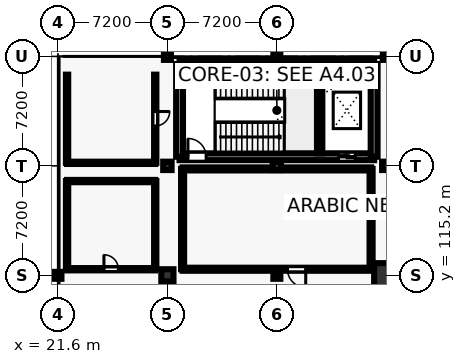
"""IFC4 building model, lengths in metres.
Left out: names, types, materials, properties, quantities, classifications, styles, units other than length and angle.
Written with IfcOpenShell. Run it as: python <this file> out.ifc"""

import sys

from ifc_helpers import new_model, si_unit, direction, frame, frame_2d, origin, origin_2d, place, context, subcontext, project, spatial, rectangle, circle, hollow_circle, extrude, element, fill, save


model = new_model("IFC4")
c1 = context("Model", 3, precision=1e-05, world=origin(), true_north=direction((0.0, 1.0)))
c2 = subcontext(c1, "Body", "Model", "MODEL_VIEW")
j1 = project(units=[si_unit("LENGTHUNIT", "METRE"), si_unit("PLANEANGLEUNIT", "RADIAN")], contexts=[c1])
p1 = place(None, origin())
s1 = spatial("IfcSite", under=j1, at=p1, CompositionType="ELEMENT")
p2 = place(p1, origin())
s2 = spatial("IfcBuilding", under=s1, at=p2, CompositionType="ELEMENT")
p3 = place(p2, frame((0.0, 0.0, 18.6)))
s3 = spatial("IfcBuildingStorey", under=s2, at=p3, CompositionType="ELEMENT", Elevation=18.6)
p4 = place(p3, frame((21.6, 115.2, 0.0), z_axis=(0.0, 0.0, 1.0), x_axis=(1.0, 0.0, 0.0)))
e1 = element("IfcColumn", 1, at=p4, inside=s3, PredefinedType="COLUMN", context=c2, shape_type="SweptSolid", body=[
    extrude(hollow_circle(Radius=0.229, WallThickness=0.02, at=origin_2d()), origin(), (0.0, 0.0, 1.0), 4.4),
])
p5 = place(p3, frame((28.8, 115.2, 0.0), z_axis=(0.0, 0.0, 1.0), x_axis=(1.0, 0.0, 0.0)))
e2 = element("IfcColumn", 2, at=p5, inside=s3, PredefinedType="COLUMN", context=c2, shape_type="SweptSolid", body=[
    extrude(circle(Radius=0.4, at=origin_2d()), origin(), (0.0, 0.0, 1.0), 4.4),
])
p6 = place(p3, frame((28.8, 122.4, 0.0), z_axis=(0.0, 0.0, 1.0), x_axis=(1.0, 0.0, 0.0)))
e3 = element("IfcColumn", 3, at=p6, inside=s3, PredefinedType="COLUMN", context=c2, shape_type="SweptSolid", body=[
    extrude(rectangle(XDim=0.55, YDim=0.55, at=origin_2d()), origin(), (0.0, 0.0, 1.0), 4.4),
])
for number, where, z_axis, x_axis in (
    (4, (28.8, 129.6, 0.0), (0.0, 0.0, 1.0), (1.0, 0.0, 0.0)),
    (5, (36.0, 115.2, 0.0), (0.0, 0.0, 1.0), (1.0, 0.0, 0.0)),
):
    element("IfcColumn", number, at=place(p3, frame(where, z_axis=z_axis, x_axis=x_axis)), inside=s3, PredefinedType="COLUMN", context=c2, shape_type="SweptSolid", body=[
        extrude(hollow_circle(Radius=0.229, WallThickness=0.02, at=origin_2d()), origin(), (0.0, 0.0, 1.0), 4.4),
    ])
p7 = place(p3, frame((36.0, 122.4, 0.0), z_axis=(0.0, 0.0, 1.0), x_axis=(1.0, 0.0, 0.0)))
e6 = element("IfcColumn", 6, at=p7, inside=s3, PredefinedType="COLUMN", context=c2, shape_type="SweptSolid", body=[
    extrude(rectangle(XDim=0.55, YDim=0.55, at=origin_2d()), origin(), (0.0, 0.0, 1.0), 4.4),
])
p8 = place(p3, frame((36.0, 129.6, 0.0), z_axis=(0.0, 0.0, 1.0), x_axis=(1.0, 0.0, 0.0)))
e7 = element("IfcColumn", 7, at=p8, inside=s3, PredefinedType="COLUMN", context=c2, shape_type="SweptSolid", body=[
    extrude(hollow_circle(Radius=0.229, WallThickness=0.02, at=origin_2d()), origin(), (0.0, 0.0, 1.0), 4.4),
])
p9 = place(p3, frame((43.2, 115.2, 0.0), z_axis=(0.0, 0.0, 1.0), x_axis=(1.0, 0.0, 0.0)))
e8 = element("IfcColumn", 8, at=p9, inside=s3, PredefinedType="COLUMN", context=c2, shape_type="SweptSolid", body=[
    extrude(circle(Radius=0.8, at=origin_2d()), origin(), (0.0, 0.0, 1.0), 4.4),
])
p10 = place(p3, frame((43.2, 122.4, 0.0), z_axis=(0.0, 0.0, 1.0), x_axis=(1.0, 0.0, 0.0)))
e9 = element("IfcColumn", 9, at=p10, inside=s3, PredefinedType="COLUMN", context=c2, shape_type="SweptSolid", body=[
    extrude(rectangle(XDim=0.55, YDim=0.55, at=origin_2d()), origin(), (0.0, 0.0, 1.0), 4.4),
])
p11 = place(p3, frame((43.2, 129.6, 0.0), z_axis=(0.0, 0.0, 1.0), x_axis=(1.0, 0.0, 0.0)))
e10 = element("IfcColumn", 10, at=p11, inside=s3, PredefinedType="COLUMN", context=c2, shape_type="SweptSolid", body=[
    extrude(hollow_circle(Radius=0.229, WallThickness=0.02, at=origin_2d()), origin(), (0.0, 0.0, 1.0), 4.4),
])
p12 = place(p3, frame((29.6, 123.0, 0.0), z_axis=(0.0, 0.0, 1.0), x_axis=(1.0, 0.0, 0.0)))
e11 = element("IfcWall", 11, at=p12, inside=s3, PredefinedType="SHEAR", context=c2, shape_type="SweptSolid", body=[
    extrude(rectangle(XDim=12.8, YDim=0.45, at=frame_2d((6.4, 0.0))), origin(), (0.0, 0.0, 1.0), 4.15),
])
p13 = place(p12, frame((0.55, 0.0, 0.0)))
e12 = element("IfcOpeningElement", 12, at=p13, cuts=e11, PredefinedType="OPENING", context=c2, shape_type="SweptSolid", body=[
    extrude(rectangle(XDim=1.2, YDim=2.25, at=frame_2d((0.6, 1.125))), frame((0.0, 0.235, 0.0), z_axis=(0.0, -1.0, 0.0), x_axis=(1.0, 0.0, 0.0)), (0.0, 0.0, 1.0), 0.47),
])
p14 = place(p12, frame((10.458, 0.0, 0.0)))
e13 = element("IfcOpeningElement", 13, at=p14, cuts=e11, PredefinedType="OPENING", context=c2, shape_type="SweptSolid", body=[
    extrude(rectangle(XDim=1.1, YDim=2.2, at=frame_2d((0.55, 1.1))), frame((0.0, 0.235, 0.0), z_axis=(0.0, -1.0, 0.0), x_axis=(1.0, 0.0, 0.0)), (0.0, 0.0, 1.0), 0.47),
])
p15 = place(p3, frame((29.6, 129.1, 0.0), z_axis=(0.0, 0.0, 1.0), x_axis=(1.0, 0.0, 0.0)))
e14 = element("IfcWall", 14, at=p15, inside=s3, PredefinedType="SHEAR", context=c2, shape_type="SweptSolid", body=[
    extrude(rectangle(XDim=12.8, YDim=0.45, at=frame_2d((6.4, 0.0))), origin(), (0.0, 0.0, 1.0), 4.15),
])
for number, where, z_axis, x_axis in (
    (15, (29.6, 123.0, 0.0), (0.0, 0.0, 1.0), (0.0, 1.0, 0.0)),
    (16, (42.4, 123.0, 0.0), (0.0, 0.0, 1.0), (0.0, 1.0, 0.0)),
):
    element("IfcWall", number, at=place(p3, frame(where, z_axis=z_axis, x_axis=x_axis)), inside=s3, PredefinedType="SHEAR", context=c2, shape_type="SweptSolid", body=[
        extrude(rectangle(XDim=6.1, YDim=0.45, at=frame_2d((3.05, 0.0))), origin(), (0.0, 0.0, 1.0), 4.15),
    ])
p16 = place(p3, frame((38.816, 123.225, 0.0), z_axis=(0.0, 0.0, 1.0), x_axis=(0.0, 1.0, 0.0)))
e17 = element("IfcWall", 17, at=p16, inside=s3, PredefinedType="SHEAR", context=c2, shape_type="SweptSolid", body=[
    extrude(rectangle(XDim=5.65, YDim=0.35, at=frame_2d((2.825, 0.0))), origin(), (0.0, 0.0, 1.0), 4.15),
])
p17 = place(p3, frame((29.8, 115.6, 0.0), z_axis=(0.0, 0.0, 1.0), x_axis=(1.0, 0.0, 0.0)))
e18 = element("IfcWall", 18, at=p17, inside=s3, PredefinedType="PARTITIONING", context=c2, shape_type="SweptSolid", body=[
    extrude(rectangle(XDim=12.4, YDim=0.2, at=frame_2d((6.2, 0.0))), origin(), (0.0, 0.0, 1.0), 3.21),
])
p18 = place(p17, frame((6.9, 0.0, 0.0)))
e19 = element("IfcOpeningElement", 19, at=p18, cuts=e18, PredefinedType="OPENING", context=c2, shape_type="SweptSolid", body=[
    extrude(rectangle(XDim=1.2, YDim=2.25, at=frame_2d((0.6, 1.125))), frame((0.0, 0.11, 0.0), z_axis=(0.0, -1.0, 0.0), x_axis=(1.0, 0.0, 0.0)), (0.0, 0.0, 1.0), 0.22),
])
p19 = place(p3, frame((42.2, 115.6, 0.0), z_axis=(0.0, 0.0, 1.0), x_axis=(0.0, 1.0, 0.0)))
e20 = element("IfcWall", 20, at=p19, inside=s3, PredefinedType="PARTITIONING", context=c2, shape_type="SweptSolid", body=[
    extrude(rectangle(XDim=6.6, YDim=0.2, at=frame_2d((3.3, 0.0))), origin(), (0.0, 0.0, 1.0), 3.21),
])
p20 = place(p3, frame((42.2, 122.2, 0.0), z_axis=(0.0, 0.0, 1.0), x_axis=(-1.0, 0.0, 0.0)))
e21 = element("IfcWall", 21, at=p20, inside=s3, PredefinedType="PARTITIONING", context=c2, shape_type="SweptSolid", body=[
    extrude(rectangle(XDim=12.4, YDim=0.2, at=frame_2d((6.2, 0.0))), origin(), (0.0, 0.0, 1.0), 3.21),
])
p21 = place(p3, frame((29.8, 122.2, 0.0), z_axis=(0.0, 0.0, 1.0), x_axis=(0.0, -1.0, 0.0)))
e22 = element("IfcWall", 22, at=p21, inside=s3, PredefinedType="PARTITIONING", context=c2, shape_type="SweptSolid", body=[
    extrude(rectangle(XDim=6.6, YDim=0.2, at=frame_2d((3.3, 0.0))), origin(), (0.0, 0.0, 1.0), 3.21),
])
p22 = place(p3, frame((22.2, 115.6, 0.0), z_axis=(0.0, 0.0, 1.0), x_axis=(1.0, 0.0, 0.0)))
e23 = element("IfcWall", 23, at=p22, inside=s3, PredefinedType="PARTITIONING", context=c2, shape_type="SweptSolid", body=[
    extrude(rectangle(XDim=5.8, YDim=0.15, at=frame_2d((2.9, 0.0))), origin(), (0.0, 0.0, 1.0), 3.21),
])
p23 = place(p22, frame((2.425, 0.0, 0.0)))
e24 = element("IfcOpeningElement", 24, at=p23, cuts=e23, PredefinedType="OPENING", context=c2, shape_type="SweptSolid", body=[
    extrude(rectangle(XDim=0.95, YDim=2.15, at=frame_2d((0.475, 1.075))), frame((0.0, 0.085, 0.0), z_axis=(0.0, -1.0, 0.0), x_axis=(1.0, 0.0, 0.0)), (0.0, 0.0, 1.0), 0.17),
])
p24 = place(p3, frame((28.0, 115.6, 0.0), z_axis=(0.0, 0.0, 1.0), x_axis=(0.0, 1.0, 0.0)))
e25 = element("IfcWall", 25, at=p24, inside=s3, PredefinedType="PARTITIONING", context=c2, shape_type="SweptSolid", body=[
    extrude(rectangle(XDim=5.8, YDim=0.15, at=frame_2d((2.9, 0.0))), origin(), (0.0, 0.0, 1.0), 3.21),
])
p25 = place(p3, frame((28.0, 121.4, 0.0), z_axis=(0.0, 0.0, 1.0), x_axis=(-1.0, 0.0, 0.0)))
e26 = element("IfcWall", 26, at=p25, inside=s3, PredefinedType="PARTITIONING", context=c2, shape_type="SweptSolid", body=[
    extrude(rectangle(XDim=5.8, YDim=0.15, at=frame_2d((2.9, 0.0))), origin(), (0.0, 0.0, 1.0), 3.21),
])
p26 = place(p3, frame((22.2, 121.4, 0.0), z_axis=(0.0, 0.0, 1.0), x_axis=(0.0, -1.0, 0.0)))
e27 = element("IfcWall", 27, at=p26, inside=s3, PredefinedType="PARTITIONING", context=c2, shape_type="SweptSolid", body=[
    extrude(rectangle(XDim=5.8, YDim=0.15, at=frame_2d((2.9, 0.0))), origin(), (0.0, 0.0, 1.0), 3.21),
])
p27 = place(p3, frame((22.2, 122.6, 0.0), z_axis=(0.0, 0.0, 1.0), x_axis=(1.0, 0.0, 0.0)))
e28 = element("IfcWall", 28, at=p27, inside=s3, PredefinedType="PARTITIONING", context=c2, shape_type="SweptSolid", body=[
    extrude(rectangle(XDim=5.8, YDim=0.15, at=frame_2d((2.9, 0.0))), origin(), (0.0, 0.0, 1.0), 3.21),
])
p28 = place(p3, frame((28.0, 122.6, 0.0), z_axis=(0.0, 0.0, 1.0), x_axis=(0.0, 1.0, 0.0)))
e29 = element("IfcWall", 29, at=p28, inside=s3, PredefinedType="PARTITIONING", context=c2, shape_type="SweptSolid", body=[
    extrude(rectangle(XDim=5.8, YDim=0.15, at=frame_2d((2.9, 0.0))), origin(), (0.0, 0.0, 1.0), 3.21),
])
p29 = place(p28, frame((2.425, 0.0, 0.0)))
e30 = element("IfcOpeningElement", 30, at=p29, cuts=e29, PredefinedType="OPENING", context=c2, shape_type="SweptSolid", body=[
    extrude(rectangle(XDim=0.95, YDim=2.15, at=frame_2d((0.475, 1.075))), frame((0.0, 0.085, 0.0), z_axis=(0.0, -1.0, 0.0), x_axis=(1.0, 0.0, 0.0)), (0.0, 0.0, 1.0), 0.17),
])
p30 = place(p3, frame((22.2, 128.4, 0.0), z_axis=(0.0, 0.0, 1.0), x_axis=(0.0, -1.0, 0.0)))
e31 = element("IfcWall", 31, at=p30, inside=s3, PredefinedType="PARTITIONING", context=c2, shape_type="SweptSolid", body=[
    extrude(rectangle(XDim=5.8, YDim=0.15, at=frame_2d((2.9, 0.0))), origin(), (0.0, 0.0, 1.0), 3.21),
])
p31 = place(p13, origin())
e32 = element("IfcDoor", 32, at=p31, inside=s3, OperationType="SINGLE_SWING_LEFT", PredefinedType="DOOR", context=c2, shape_type="SweptSolid", body=[
    extrude(rectangle(XDim=1.2, YDim=2.25, at=frame_2d((0.6, 1.125))), frame((0.0, 0.025, 0.0), z_axis=(0.0, -1.0, 0.0), x_axis=(1.0, 0.0, 0.0)), (0.0, 0.0, 1.0), 0.05),
])
fill(e12, e32)
p32 = place(p14, origin())
e33 = element("IfcDoor", 33, at=p32, inside=s3, OperationType="SLIDING_TO_RIGHT", PredefinedType="DOOR", context=c2, shape_type="SweptSolid", body=[
    extrude(rectangle(XDim=1.1, YDim=2.2, at=frame_2d((0.55, 1.1))), frame((0.0, 0.025, 0.0), z_axis=(0.0, -1.0, 0.0), x_axis=(1.0, 0.0, 0.0)), (0.0, 0.0, 1.0), 0.05),
])
fill(e13, e33)
p33 = place(p18, frame((1.2, 0.0, 0.0), z_axis=(0.0, 0.0, 1.0), x_axis=(-1.0, 0.0, 0.0)))
e34 = element("IfcDoor", 34, at=p33, inside=s3, OperationType="SINGLE_SWING_RIGHT", PredefinedType="DOOR", context=c2, shape_type="SweptSolid", body=[
    extrude(rectangle(XDim=1.2, YDim=2.25, at=frame_2d((0.6, 1.125))), frame((0.0, 0.025, 0.0), z_axis=(0.0, -1.0, 0.0), x_axis=(1.0, 0.0, 0.0)), (0.0, 0.0, 1.0), 0.05),
])
fill(e19, e34)
p34 = place(p23, origin())
e35 = element("IfcDoor", 35, at=p34, inside=s3, OperationType="SINGLE_SWING_LEFT", PredefinedType="DOOR", context=c2, shape_type="SweptSolid", body=[
    extrude(rectangle(XDim=0.95, YDim=2.15, at=frame_2d((0.475, 1.075))), frame((0.0, 0.025, 0.0), z_axis=(0.0, -1.0, 0.0), x_axis=(1.0, 0.0, 0.0)), (0.0, 0.0, 1.0), 0.05),
])
fill(e24, e35)
p35 = place(p29, frame((0.95, 0.0, 0.0), z_axis=(0.0, 0.0, 1.0), x_axis=(-1.0, 0.0, 0.0)))
e36 = element("IfcDoor", 36, at=p35, inside=s3, OperationType="SINGLE_SWING_RIGHT", PredefinedType="DOOR", context=c2, shape_type="SweptSolid", body=[
    extrude(rectangle(XDim=0.95, YDim=2.15, at=frame_2d((0.475, 1.075))), frame((0.0, 0.025, 0.0), z_axis=(0.0, -1.0, 0.0), x_axis=(1.0, 0.0, 0.0)), (0.0, 0.0, 1.0), 0.05),
])
fill(e30, e36)
save(model, sys.argv[1])
